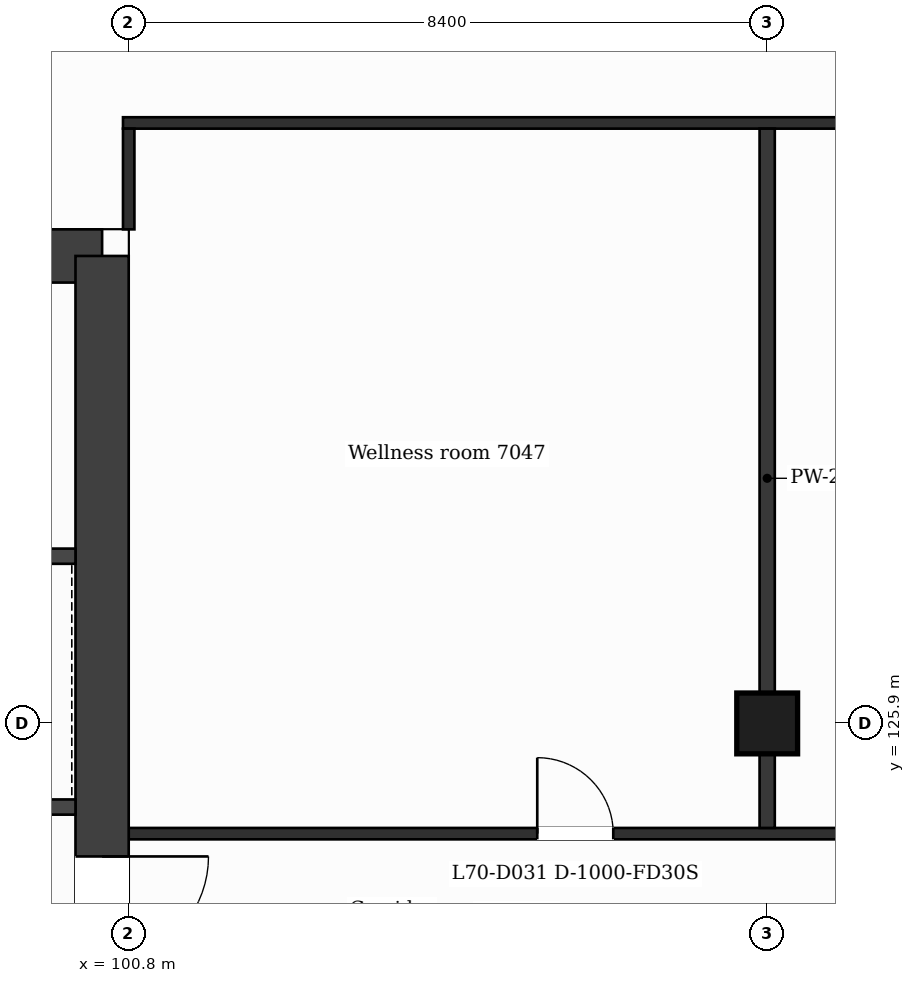
"""IFC4 building model, lengths in metres.
Left out: names, types, materials, properties, quantities, classifications, styles, units other than length and angle.
Written with IfcOpenShell. Run it as: python <this file> out.ifc"""

import sys

from ifc_helpers import new_model, si_unit, direction, frame, frame_2d, origin, origin_2d, place, context, subcontext, project, spatial, rectangle, extrude, element, fill, save


model = new_model("IFC4")
c1 = context("Model", 3, precision=1e-05, world=origin(), true_north=direction((0.0, 1.0)))
c2 = subcontext(c1, "Body", "Model", "MODEL_VIEW")
j1 = project(units=[si_unit("LENGTHUNIT", "METRE"), si_unit("PLANEANGLEUNIT", "RADIAN")], contexts=[c1])
p1 = place(None, origin())
s1 = spatial("IfcSite", under=j1, at=p1, CompositionType="ELEMENT")
p2 = place(p1, origin())
s2 = spatial("IfcBuilding", under=s1, at=p2, CompositionType="ELEMENT")
p3 = place(p2, frame((0.0, 0.0, 288.6)))
s3 = spatial("IfcBuildingStorey", under=s2, at=p3, CompositionType="ELEMENT", Elevation=288.6)
p4 = place(p3, frame((88.937, 132.05, 0.0), z_axis=(0.0, 0.0, 1.0), x_axis=(1.0, 0.0, 0.0)))
e1 = element("IfcWall", 1, at=p4, inside=s3, PredefinedType="SHEAR", context=c2, shape_type="SweptSolid", body=[
    extrude(rectangle(XDim=11.513, YDim=0.7, at=frame_2d((5.757, 0.0))), origin(), (0.0, 0.0, 1.0), 3.7),
])
p5 = place(p4, frame((6.927, 0.0, 0.0)))
e2 = element("IfcOpeningElement", 2, at=p5, cuts=e1, PredefinedType="OPENING", context=c2, shape_type="SweptSolid", body=[
    extrude(rectangle(XDim=1.2, YDim=2.1, at=frame_2d((0.6, 1.05))), frame((0.0, 0.36, 0.0), z_axis=(0.0, -1.0, 0.0), x_axis=(1.0, 0.0, 0.0)), (0.0, 0.0, 1.0), 0.72),
])
p6 = place(p3, frame((100.45, 132.05, 0.0), z_axis=(0.0, 0.0, 1.0), x_axis=(0.0, -1.0, 0.0)))
e3 = element("IfcWall", 3, at=p6, inside=s3, PredefinedType="SHEAR", context=c2, shape_type="SweptSolid", body=[
    extrude(rectangle(XDim=15.7, YDim=0.7, at=frame_2d((7.85, 0.0))), origin(), (0.0, 0.0, 1.0), 3.7),
])
p7 = place(p6, frame((7.9, 0.0, 0.0)))
e4 = element("IfcOpeningElement", 4, at=p7, cuts=e3, PredefinedType="OPENING", context=c2, shape_type="SweptSolid", body=[
    extrude(rectangle(XDim=1.4, YDim=2.1, at=frame_2d((0.7, 1.05))), frame((0.0, 0.36, 0.0), z_axis=(0.0, -1.0, 0.0), x_axis=(1.0, 0.0, 0.0)), (0.0, 0.0, 1.0), 0.72),
])
p8 = place(p3, frame((109.2, 125.9, 0.0), z_axis=(0.0, 0.0, 1.0), x_axis=(1.0, 0.0, 0.0)))
e5 = element("IfcColumn", 5, at=p8, inside=s3, PredefinedType="COLUMN", context=c2, shape_type="SweptSolid", body=[
    extrude(rectangle(XDim=0.8, YDim=0.8, at=origin_2d()), origin(), (0.0, 0.0, 1.0), 3.7),
])
p9 = place(p3, frame((100.8, 124.45, 0.0), z_axis=(0.0, 0.0, 1.0), x_axis=(1.0, 0.0, 0.0)))
e6 = element("IfcWall", 6, at=p9, inside=s3, PredefinedType="PARTITIONING", context=c2, shape_type="SweptSolid", body=[
    extrude(rectangle(XDim=25.2, YDim=0.15, at=frame_2d((12.6, 0.0))), origin(), (0.0, 0.0, 1.0), 3.38),
])
p10 = place(p9, frame((21.075, 0.0, 0.0)))
e7 = element("IfcOpeningElement", 7, at=p10, cuts=e6, PredefinedType="OPENING", context=c2, shape_type="SweptSolid", body=[
    extrude(rectangle(XDim=1.0, YDim=2.1, at=frame_2d((0.5, 1.05))), frame((0.0, 0.085, 0.0), z_axis=(0.0, -1.0, 0.0), x_axis=(1.0, 0.0, 0.0)), (0.0, 0.0, 1.0), 0.17),
])
p11 = place(p9, frame((5.375, 0.0, 0.0)))
e8 = element("IfcOpeningElement", 8, at=p11, cuts=e6, PredefinedType="OPENING", context=c2, shape_type="SweptSolid", body=[
    extrude(rectangle(XDim=1.0, YDim=2.1, at=frame_2d((0.5, 1.05))), frame((0.0, 0.085, 0.0), z_axis=(0.0, -1.0, 0.0), x_axis=(1.0, 0.0, 0.0)), (0.0, 0.0, 1.0), 0.17),
])
p12 = place(p9, frame((12.1, 0.0, 0.0)))
e9 = element("IfcOpeningElement", 9, at=p12, cuts=e6, PredefinedType="OPENING", context=c2, shape_type="SweptSolid", body=[
    extrude(rectangle(XDim=1.0, YDim=2.1, at=frame_2d((0.5, 1.05))), frame((0.0, 0.085, 0.0), z_axis=(0.0, -1.0, 0.0), x_axis=(1.0, 0.0, 0.0)), (0.0, 0.0, 1.0), 0.17),
])
p13 = place(p9, frame((17.93, 0.0, 0.0)))
e10 = element("IfcOpeningElement", 10, at=p13, cuts=e6, PredefinedType="OPENING", context=c2, shape_type="SweptSolid", body=[
    extrude(rectangle(XDim=1.0, YDim=2.1, at=frame_2d((0.5, 1.05))), frame((0.0, 0.085, 0.0), z_axis=(0.0, -1.0, 0.0), x_axis=(1.0, 0.0, 0.0)), (0.0, 0.0, 1.0), 0.17),
])
p14 = place(p3, frame((92.702, 124.8, 0.0), z_axis=(0.0, 0.0, 1.0), x_axis=(1.0, 0.0, 0.0)))
e11 = element("IfcWall", 11, at=p14, inside=s3, PredefinedType="PARTITIONING", context=c2, shape_type="SweptSolid", body=[
    extrude(rectangle(XDim=7.398, YDim=0.2, at=frame_2d((3.699, 0.0))), origin(), (0.0, 0.0, 1.0), 3.38),
])
p15 = place(p14, frame((5.573, 0.0, 0.0)))
e12 = element("IfcOpeningElement", 12, at=p15, cuts=e11, PredefinedType="OPENING", context=c2, shape_type="SweptSolid", body=[
    extrude(rectangle(XDim=1.1, YDim=2.1, at=frame_2d((0.55, 1.05))), frame((0.0, 0.11, 0.0), z_axis=(0.0, -1.0, 0.0), x_axis=(1.0, 0.0, 0.0)), (0.0, 0.0, 1.0), 0.22),
])
p16 = place(p3, frame((92.827, 128.1, 0.0), z_axis=(0.0, 0.0, 1.0), x_axis=(1.0, 0.0, 0.0)))
e13 = element("IfcWall", 13, at=p16, inside=s3, PredefinedType="PARTITIONING", context=c2, shape_type="SweptSolid", body=[
    extrude(rectangle(XDim=7.273, YDim=0.2, at=frame_2d((3.637, 0.0))), origin(), (0.0, 0.0, 1.0), 3.38),
])
p17 = place(p16, frame((3.086, 0.0, 0.0)))
e14 = element("IfcOpeningElement", 14, at=p17, cuts=e13, PredefinedType="OPENING", context=c2, shape_type="SweptSolid", body=[
    extrude(rectangle(XDim=1.1, YDim=2.1, at=frame_2d((0.55, 1.05))), frame((0.0, 0.11, 0.0), z_axis=(0.0, -1.0, 0.0), x_axis=(1.0, 0.0, 0.0)), (0.0, 0.0, 1.0), 0.22),
])
p18 = place(p3, frame((100.725, 133.8, 0.0), z_axis=(0.0, 0.0, 1.0), x_axis=(1.0, 0.0, 0.0)))
e15 = element("IfcWall", 15, at=p18, inside=s3, PredefinedType="PARTITIONING", context=c2, shape_type="SweptSolid", body=[
    extrude(rectangle(XDim=25.35, YDim=0.15, at=frame_2d((12.675, 0.0))), origin(), (0.0, 0.0, 1.0), 3.38),
])
p19 = place(p3, frame((100.8, 132.4, 0.0), z_axis=(0.0, 0.0, 1.0), x_axis=(0.0, 1.0, 0.0)))
e16 = element("IfcWall", 16, at=p19, inside=s3, PredefinedType="PARTITIONING", context=c2, shape_type="SweptSolid", body=[
    extrude(rectangle(XDim=1.325, YDim=0.15, at=frame_2d((0.663, 0.0))), origin(), (0.0, 0.0, 1.0), 3.38),
])
p20 = place(p3, frame((109.2, 124.525, 0.0), z_axis=(0.0, 0.0, 1.0), x_axis=(0.0, 1.0, 0.0)))
e17 = element("IfcWall", 17, at=p20, inside=s3, PredefinedType="PARTITIONING", context=c2, shape_type="SweptSolid", body=[
    extrude(rectangle(XDim=9.2, YDim=0.2, at=frame_2d((4.6, 0.0))), origin(), (0.0, 0.0, 1.0), 3.38),
])
p21 = place(p11, origin())
e18 = element("IfcDoor", 18, at=p21, inside=s3, OperationType="SINGLE_SWING_LEFT", PredefinedType="DOOR", context=c2, shape_type="SweptSolid", body=[
    extrude(rectangle(XDim=1.0, YDim=2.1, at=frame_2d((0.5, 1.05))), frame((0.0, 0.025, 0.0), z_axis=(0.0, -1.0, 0.0), x_axis=(1.0, 0.0, 0.0)), (0.0, 0.0, 1.0), 0.05),
])
fill(e8, e18)
p22 = place(p7, origin())
e19 = element("IfcDoor", 19, at=p22, inside=s3, OperationType="SINGLE_SWING_LEFT", PredefinedType="DOOR", context=c2, shape_type="SweptSolid", body=[
    extrude(rectangle(XDim=1.4, YDim=2.1, at=frame_2d((0.7, 1.05))), frame((0.0, 0.025, 0.0), z_axis=(0.0, -1.0, 0.0), x_axis=(1.0, 0.0, 0.0)), (0.0, 0.0, 1.0), 0.05),
])
fill(e4, e19)
save(model, sys.argv[1])
